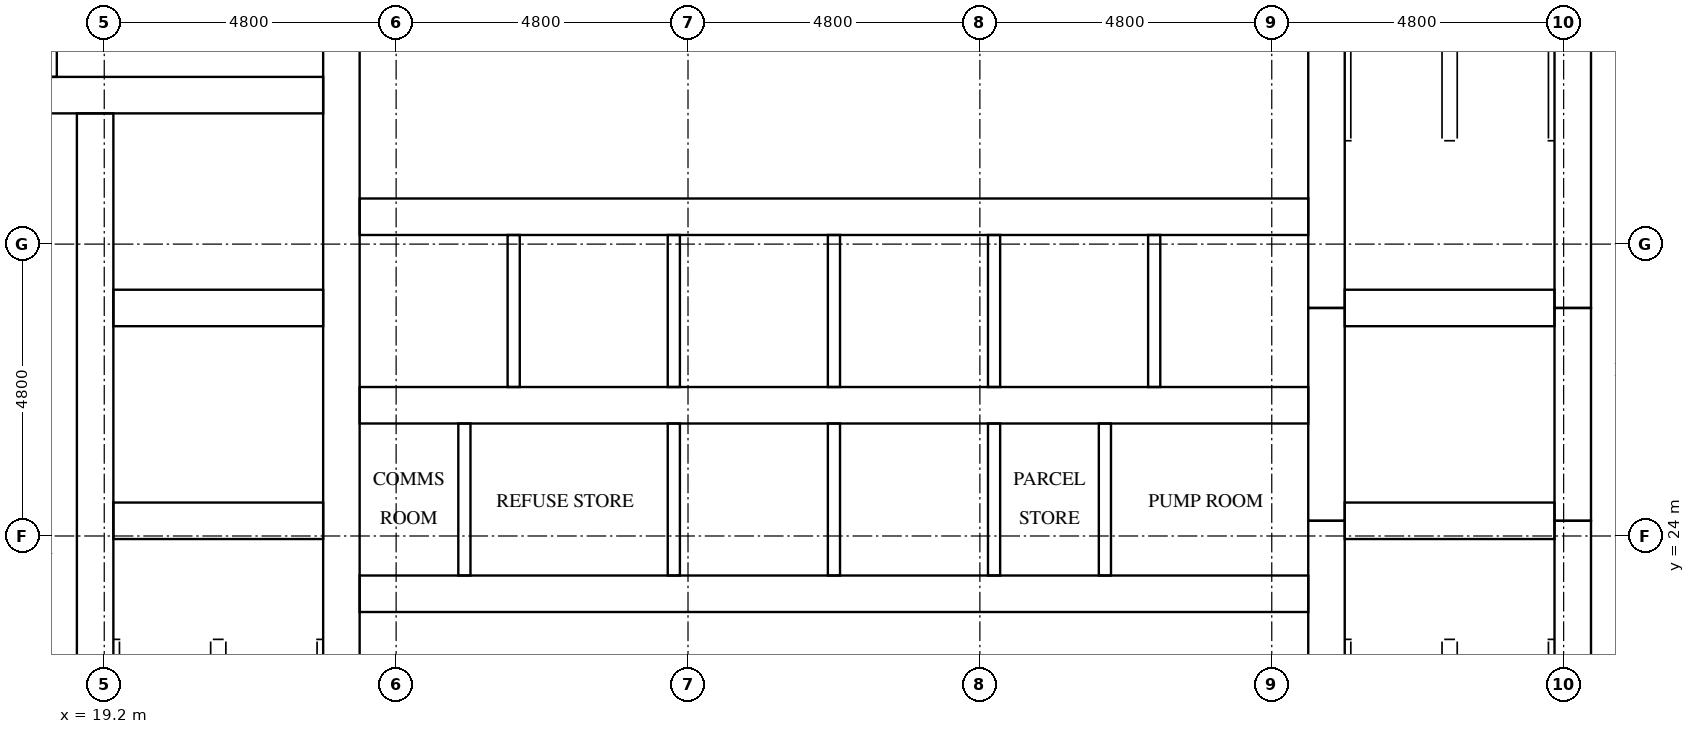
"""IFC4 building model, lengths in metres.
Left out: names, types, materials, properties, quantities, classifications, styles, units other than length and angle.
Written with IfcOpenShell. Run it as: python <this file> out.ifc"""

import sys

from ifc_helpers import new_model, si_unit, direction, frame, frame_2d, origin, place, context, subcontext, project, spatial, rectangle, extrude, element, fill, save


model = new_model("IFC4")
c1 = context("Model", 3, precision=1e-05, world=origin(), true_north=direction((0.0, 1.0)))
c2 = subcontext(c1, "Body", "Model", "MODEL_VIEW")
j1 = project(units=[si_unit("LENGTHUNIT", "METRE"), si_unit("PLANEANGLEUNIT", "RADIAN")], contexts=[c1])
p1 = place(None, origin())
s1 = spatial("IfcSite", under=j1, at=p1, CompositionType="ELEMENT")
p2 = place(p1, origin())
s2 = spatial("IfcBuilding", under=s1, at=p2, CompositionType="ELEMENT")
p3 = place(p2, frame((0.0, 0.0, 143.6)))
s3 = spatial("IfcBuildingStorey", under=s2, at=p3, CompositionType="ELEMENT", Elevation=143.6)
p4 = place(p3, frame((19.05, 15.8, 0.0), z_axis=(0.0, 0.0, 1.0), x_axis=(0.0, 1.0, 0.0)))
e1 = element("IfcWall", 1, at=p4, inside=s3, PredefinedType="SHEAR", context=c2, shape_type="SweptSolid", body=[
    extrude(rectangle(XDim=15.15, YDim=0.6, at=frame_2d((7.575, 0.0))), origin(), (0.0, 0.0, 1.0), 5.1),
])
p5 = place(p4, frame((9.65, 0.0, 0.0)))
e2 = element("IfcOpeningElement", 2, at=p5, cuts=e1, PredefinedType="OPENING", context=c2, shape_type="SweptSolid", body=[
    extrude(rectangle(XDim=1.1, YDim=2.1, at=frame_2d((0.55, 1.05))), frame((0.0, 0.31, 0.0), z_axis=(0.0, -1.0, 0.0), x_axis=(1.0, 0.0, 0.0)), (0.0, 0.0, 1.0), 0.62),
])
p6 = place(p4, frame((13.15, 0.0, 0.0)))
e3 = element("IfcOpeningElement", 3, at=p6, cuts=e1, PredefinedType="OPENING", context=c2, shape_type="SweptSolid", body=[
    extrude(rectangle(XDim=1.1, YDim=2.1, at=frame_2d((0.55, 1.05))), frame((0.0, 0.31, 0.0), z_axis=(0.0, -1.0, 0.0), x_axis=(1.0, 0.0, 0.0)), (0.0, 0.0, 1.0), 0.62),
])
p7 = place(p4, frame((0.4, 0.0, 0.0)))
e4 = element("IfcOpeningElement", 4, at=p7, cuts=e1, PredefinedType="OPENING", context=c2, shape_type="SweptSolid", body=[
    extrude(rectangle(XDim=1.2, YDim=2.1, at=frame_2d((0.6, 1.05))), frame((0.0, 0.31, 0.0), z_axis=(0.0, -1.0, 0.0), x_axis=(1.0, 0.0, 0.0)), (0.0, 0.0, 1.0), 0.62),
])
p8 = place(p3, frame((23.1, 15.8, 0.0), z_axis=(0.0, 0.0, 1.0), x_axis=(0.0, 1.0, 0.0)))
e5 = element("IfcWall", 5, at=p8, inside=s3, PredefinedType="SHEAR", context=c2, shape_type="SweptSolid", body=[
    extrude(rectangle(XDim=21.2, YDim=0.6, at=frame_2d((10.6, 0.0))), origin(), (0.0, 0.0, 1.0), 5.1),
])
p9 = place(p3, frame((39.3, 15.8, 0.0), z_axis=(0.0, 0.0, 1.0), x_axis=(0.0, 1.0, 0.0)))
e6 = element("IfcWall", 6, at=p9, inside=s3, PredefinedType="SHEAR", context=c2, shape_type="SweptSolid", body=[
    extrude(rectangle(XDim=8.45, YDim=0.6, at=frame_2d((4.225, 0.0))), origin(), (0.0, 0.0, 1.0), 5.1),
])
p10 = place(p3, frame((39.3, 24.25, 0.0), z_axis=(0.0, 0.0, 1.0), x_axis=(0.0, 1.0, 0.0)))
e7 = element("IfcWall", 7, at=p10, inside=s3, PredefinedType="SHEAR", context=c2, shape_type="SweptSolid", body=[
    extrude(rectangle(XDim=3.5, YDim=0.6, at=frame_2d((1.75, 0.0))), origin(), (0.0, 0.0, 1.0), 5.1),
])
p11 = place(p3, frame((39.3, 27.75, 0.0), z_axis=(0.0, 0.0, 1.0), x_axis=(0.0, 1.0, 0.0)))
e8 = element("IfcWall", 8, at=p11, inside=s3, PredefinedType="SHEAR", context=c2, shape_type="SweptSolid", body=[
    extrude(rectangle(XDim=9.25, YDim=0.6, at=frame_2d((4.625, 0.0))), origin(), (0.0, 0.0, 1.0), 5.1),
])
p12 = place(p3, frame((43.35, 15.8, 0.0), z_axis=(0.0, 0.0, 1.0), x_axis=(0.0, 1.0, 0.0)))
e9 = element("IfcWall", 9, at=p12, inside=s3, PredefinedType="SHEAR", context=c2, shape_type="SweptSolid", body=[
    extrude(rectangle(XDim=8.45, YDim=0.6, at=frame_2d((4.225, 0.0))), origin(), (0.0, 0.0, 1.0), 5.1),
])
p13 = place(p12, frame((0.4, 0.0, 0.0)))
e10 = element("IfcOpeningElement", 10, at=p13, cuts=e9, PredefinedType="OPENING", context=c2, shape_type="SweptSolid", body=[
    extrude(rectangle(XDim=1.2, YDim=2.1, at=frame_2d((0.6, 1.05))), frame((0.0, 0.31, 0.0), z_axis=(0.0, -1.0, 0.0), x_axis=(1.0, 0.0, 0.0)), (0.0, 0.0, 1.0), 0.62),
])
p14 = place(p3, frame((43.35, 24.25, 0.0), z_axis=(0.0, 0.0, 1.0), x_axis=(0.0, 1.0, 0.0)))
e11 = element("IfcWall", 11, at=p14, inside=s3, PredefinedType="SHEAR", context=c2, shape_type="SweptSolid", body=[
    extrude(rectangle(XDim=3.5, YDim=0.6, at=frame_2d((1.75, 0.0))), origin(), (0.0, 0.0, 1.0), 5.1),
])
p15 = place(p14, frame((1.2, 0.0, 0.0)))
e12 = element("IfcOpeningElement", 12, at=p15, cuts=e11, PredefinedType="OPENING", context=c2, shape_type="SweptSolid", body=[
    extrude(rectangle(XDim=1.1, YDim=2.1, at=frame_2d((0.55, 1.05))), frame((0.0, 0.31, 0.0), z_axis=(0.0, -1.0, 0.0), x_axis=(1.0, 0.0, 0.0)), (0.0, 0.0, 1.0), 0.62),
])
p16 = place(p3, frame((43.35, 27.75, 0.0), z_axis=(0.0, 0.0, 1.0), x_axis=(0.0, 1.0, 0.0)))
e13 = element("IfcWall", 13, at=p16, inside=s3, PredefinedType="SHEAR", context=c2, shape_type="SweptSolid", body=[
    extrude(rectangle(XDim=9.25, YDim=0.6, at=frame_2d((4.625, 0.0))), origin(), (0.0, 0.0, 1.0), 5.1),
])
p17 = place(p16, frame((7.65, 0.0, 0.0)))
e14 = element("IfcOpeningElement", 14, at=p17, cuts=e13, PredefinedType="OPENING", context=c2, shape_type="SweptSolid", body=[
    extrude(rectangle(XDim=1.2, YDim=2.1, at=frame_2d((0.6, 1.05))), frame((0.0, 0.31, 0.0), z_axis=(0.0, -1.0, 0.0), x_axis=(1.0, 0.0, 0.0)), (0.0, 0.0, 1.0), 0.62),
])
for number, where, z_axis, x_axis in (
    (15, (19.35, 24.25, 0.0), (0.0, 0.0, 1.0), (1.0, 0.0, 0.0)),
    (16, (19.35, 27.75, 0.0), (0.0, 0.0, 1.0), (1.0, 0.0, 0.0)),
):
    element("IfcWall", number, at=place(p3, frame(where, z_axis=z_axis, x_axis=x_axis)), inside=s3, PredefinedType="SHEAR", context=c2, shape_type="SweptSolid", body=[
        extrude(rectangle(XDim=3.45, YDim=0.6, at=frame_2d((1.725, 0.0))), origin(), (0.0, 0.0, 1.0), 5.1),
    ])
p18 = place(p3, frame((15.8, 31.25, 0.0), z_axis=(0.0, 0.0, 1.0), x_axis=(1.0, 0.0, 0.0)))
e17 = element("IfcWall", 17, at=p18, inside=s3, PredefinedType="SHEAR", context=c2, shape_type="SweptSolid", body=[
    extrude(rectangle(XDim=7.0, YDim=0.6, at=frame_2d((3.5, 0.0))), origin(), (0.0, 0.0, 1.0), 5.1),
])
for number, where, z_axis, x_axis in (
    (18, (39.6, 24.25, 0.0), (0.0, 0.0, 1.0), (1.0, 0.0, 0.0)),
    (19, (39.6, 27.75, 0.0), (0.0, 0.0, 1.0), (1.0, 0.0, 0.0)),
):
    element("IfcWall", number, at=place(p3, frame(where, z_axis=z_axis, x_axis=x_axis)), inside=s3, PredefinedType="SHEAR", context=c2, shape_type="SweptSolid", body=[
        extrude(rectangle(XDim=3.45, YDim=0.6, at=frame_2d((1.725, 0.0))), origin(), (0.0, 0.0, 1.0), 5.1),
    ])
p19 = place(p3, frame((23.4, 23.05, 0.0), z_axis=(0.0, 0.0, 1.0), x_axis=(1.0, 0.0, 0.0)))
e20 = element("IfcWall", 20, at=p19, inside=s3, PredefinedType="SHEAR", context=c2, shape_type="SweptSolid", body=[
    extrude(rectangle(XDim=15.6, YDim=0.6, at=frame_2d((7.8, 0.0))), origin(), (0.0, 0.0, 1.0), 5.1),
])
p20 = place(p19, frame((0.311, 0.0, 0.0)))
e21 = element("IfcOpeningElement", 21, at=p20, cuts=e20, PredefinedType="OPENING", context=c2, shape_type="SweptSolid", body=[
    extrude(rectangle(XDim=1.0, YDim=2.1, at=frame_2d((0.5, 1.05))), frame((0.0, 0.31, 0.0), z_axis=(0.0, -1.0, 0.0), x_axis=(1.0, 0.0, 0.0)), (0.0, 0.0, 1.0), 0.62),
])
p21 = place(p19, frame((2.945, 0.0, 0.0)))
e22 = element("IfcOpeningElement", 22, at=p21, cuts=e20, PredefinedType="OPENING", context=c2, shape_type="SweptSolid", body=[
    extrude(rectangle(XDim=1.0, YDim=2.1, at=frame_2d((0.5, 1.05))), frame((0.0, 0.31, 0.0), z_axis=(0.0, -1.0, 0.0), x_axis=(1.0, 0.0, 0.0)), (0.0, 0.0, 1.0), 0.62),
])
p22 = place(p19, frame((10.845, 0.0, 0.0)))
e23 = element("IfcOpeningElement", 23, at=p22, cuts=e20, PredefinedType="OPENING", context=c2, shape_type="SweptSolid", body=[
    extrude(rectangle(XDim=1.0, YDim=2.1, at=frame_2d((0.5, 1.05))), frame((0.0, 0.31, 0.0), z_axis=(0.0, -1.0, 0.0), x_axis=(1.0, 0.0, 0.0)), (0.0, 0.0, 1.0), 0.62),
])
p23 = place(p19, frame((13.478, 0.0, 0.0)))
e24 = element("IfcOpeningElement", 24, at=p23, cuts=e20, PredefinedType="OPENING", context=c2, shape_type="SweptSolid", body=[
    extrude(rectangle(XDim=1.0, YDim=2.1, at=frame_2d((0.5, 1.05))), frame((0.0, 0.31, 0.0), z_axis=(0.0, -1.0, 0.0), x_axis=(1.0, 0.0, 0.0)), (0.0, 0.0, 1.0), 0.62),
])
p24 = place(p3, frame((23.4, 26.15, 0.0), z_axis=(0.0, 0.0, 1.0), x_axis=(1.0, 0.0, 0.0)))
e25 = element("IfcWall", 25, at=p24, inside=s3, PredefinedType="SHEAR", context=c2, shape_type="SweptSolid", body=[
    extrude(rectangle(XDim=15.6, YDim=0.6, at=frame_2d((7.8, 0.0))), origin(), (0.0, 0.0, 1.0), 5.1),
])
p25 = place(p3, frame((23.4, 29.25, 0.0), z_axis=(0.0, 0.0, 1.0), x_axis=(1.0, 0.0, 0.0)))
e26 = element("IfcWall", 26, at=p25, inside=s3, PredefinedType="SHEAR", context=c2, shape_type="SweptSolid", body=[
    extrude(rectangle(XDim=15.6, YDim=0.6, at=frame_2d((7.8, 0.0))), origin(), (0.0, 0.0, 1.0), 5.1),
])
p26 = place(p25, frame((0.667, 0.0, 0.0)))
e27 = element("IfcOpeningElement", 27, at=p26, cuts=e26, PredefinedType="OPENING", context=c2, shape_type="SweptSolid", body=[
    extrude(rectangle(XDim=1.1, YDim=2.1, at=frame_2d((0.55, 1.05))), frame((0.0, 0.31, 0.0), z_axis=(0.0, -1.0, 0.0), x_axis=(1.0, 0.0, 0.0)), (0.0, 0.0, 1.0), 0.62),
])
p27 = place(p25, frame((3.3, 0.0, 0.0)))
e28 = element("IfcOpeningElement", 28, at=p27, cuts=e26, PredefinedType="OPENING", context=c2, shape_type="SweptSolid", body=[
    extrude(rectangle(XDim=1.1, YDim=2.1, at=frame_2d((0.55, 1.05))), frame((0.0, 0.31, 0.0), z_axis=(0.0, -1.0, 0.0), x_axis=(1.0, 0.0, 0.0)), (0.0, 0.0, 1.0), 0.62),
])
p28 = place(p25, frame((5.933, 0.0, 0.0)))
e29 = element("IfcOpeningElement", 29, at=p28, cuts=e26, PredefinedType="OPENING", context=c2, shape_type="SweptSolid", body=[
    extrude(rectangle(XDim=1.1, YDim=2.1, at=frame_2d((0.55, 1.05))), frame((0.0, 0.31, 0.0), z_axis=(0.0, -1.0, 0.0), x_axis=(1.0, 0.0, 0.0)), (0.0, 0.0, 1.0), 0.62),
])
p29 = place(p25, frame((8.567, 0.0, 0.0)))
e30 = element("IfcOpeningElement", 30, at=p29, cuts=e26, PredefinedType="OPENING", context=c2, shape_type="SweptSolid", body=[
    extrude(rectangle(XDim=1.1, YDim=2.1, at=frame_2d((0.55, 1.05))), frame((0.0, 0.31, 0.0), z_axis=(0.0, -1.0, 0.0), x_axis=(1.0, 0.0, 0.0)), (0.0, 0.0, 1.0), 0.62),
])
p30 = place(p25, frame((11.2, 0.0, 0.0)))
e31 = element("IfcOpeningElement", 31, at=p30, cuts=e26, PredefinedType="OPENING", context=c2, shape_type="SweptSolid", body=[
    extrude(rectangle(XDim=1.1, YDim=2.1, at=frame_2d((0.55, 1.05))), frame((0.0, 0.31, 0.0), z_axis=(0.0, -1.0, 0.0), x_axis=(1.0, 0.0, 0.0)), (0.0, 0.0, 1.0), 0.62),
])
p31 = place(p25, frame((13.833, 0.0, 0.0)))
e32 = element("IfcOpeningElement", 32, at=p31, cuts=e26, PredefinedType="OPENING", context=c2, shape_type="SweptSolid", body=[
    extrude(rectangle(XDim=1.1, YDim=2.1, at=frame_2d((0.55, 1.05))), frame((0.0, 0.31, 0.0), z_axis=(0.0, -1.0, 0.0), x_axis=(1.0, 0.0, 0.0)), (0.0, 0.0, 1.0), 0.62),
])
for number, where, z_axis, x_axis in (
    (33, (25.933, 26.45, 0.0), (0.0, 0.0, 1.0), (0.0, 1.0, 0.0)),
    (34, (28.567, 23.35, 0.0), (0.0, 0.0, 1.0), (0.0, 1.0, 0.0)),
    (35, (28.567, 26.45, 0.0), (0.0, 0.0, 1.0), (0.0, 1.0, 0.0)),
    (36, (31.2, 23.35, 0.0), (0.0, 0.0, 1.0), (0.0, 1.0, 0.0)),
    (37, (31.2, 26.45, 0.0), (0.0, 0.0, 1.0), (0.0, 1.0, 0.0)),
    (38, (33.833, 23.35, 0.0), (0.0, 0.0, 1.0), (0.0, 1.0, 0.0)),
    (39, (33.833, 26.45, 0.0), (0.0, 0.0, 1.0), (0.0, 1.0, 0.0)),
    (40, (36.467, 26.45, 0.0), (0.0, 0.0, 1.0), (0.0, 1.0, 0.0)),
):
    element("IfcWall", number, at=place(p3, frame(where, z_axis=z_axis, x_axis=x_axis)), inside=s3, PredefinedType="SOLIDWALL", context=c2, shape_type="SweptSolid", body=[
        extrude(rectangle(XDim=2.5, YDim=0.2, at=frame_2d((1.25, 0.0))), origin(), (0.0, 0.0, 1.0), 5.1),
    ])
p32 = place(p3, frame((18.32, 31.55, 0.0), z_axis=(0.0, 0.0, 1.0), x_axis=(0.0, 1.0, 0.0)))
e41 = element("IfcWall", 41, at=p32, inside=s3, PredefinedType="PARTITIONING", context=c2, shape_type="SweptSolid", body=[
    extrude(rectangle(XDim=5.45, YDim=0.2, at=frame_2d((2.725, 0.0))), origin(), (0.0, 0.0, 1.0), 5.1),
])
for number, where, z_axis, x_axis in (
    (42, (25.123, 23.35, 0.0), (0.0, 0.0, 1.0), (0.0, 1.0, 0.0)),
    (43, (35.656, 23.35, 0.0), (0.0, 0.0, 1.0), (0.0, 1.0, 0.0)),
):
    element("IfcWall", number, at=place(p3, frame(where, z_axis=z_axis, x_axis=x_axis)), inside=s3, PredefinedType="PARTITIONING", context=c2, shape_type="SweptSolid", body=[
        extrude(rectangle(XDim=2.5, YDim=0.2, at=frame_2d((1.25, 0.0))), origin(), (0.0, 0.0, 1.0), 5.1),
    ])
p33 = place(p26, origin())
e44 = element("IfcDoor", 44, at=p33, inside=s3, OperationType="DOUBLE_DOOR_SLIDING", PredefinedType="DOOR", context=c2, shape_type="SweptSolid", body=[
    extrude(rectangle(XDim=1.1, YDim=2.1, at=frame_2d((0.55, 1.05))), frame((0.0, 0.025, 0.0), z_axis=(0.0, -1.0, 0.0), x_axis=(1.0, 0.0, 0.0)), (0.0, 0.0, 1.0), 0.05),
])
fill(e27, e44)
p34 = place(p27, origin())
e45 = element("IfcDoor", 45, at=p34, inside=s3, OperationType="DOUBLE_DOOR_SLIDING", PredefinedType="DOOR", context=c2, shape_type="SweptSolid", body=[
    extrude(rectangle(XDim=1.1, YDim=2.1, at=frame_2d((0.55, 1.05))), frame((0.0, 0.025, 0.0), z_axis=(0.0, -1.0, 0.0), x_axis=(1.0, 0.0, 0.0)), (0.0, 0.0, 1.0), 0.05),
])
fill(e28, e45)
p35 = place(p28, origin())
e46 = element("IfcDoor", 46, at=p35, inside=s3, OperationType="DOUBLE_DOOR_SLIDING", PredefinedType="DOOR", context=c2, shape_type="SweptSolid", body=[
    extrude(rectangle(XDim=1.1, YDim=2.1, at=frame_2d((0.55, 1.05))), frame((0.0, 0.025, 0.0), z_axis=(0.0, -1.0, 0.0), x_axis=(1.0, 0.0, 0.0)), (0.0, 0.0, 1.0), 0.05),
])
fill(e29, e46)
p36 = place(p29, origin())
e47 = element("IfcDoor", 47, at=p36, inside=s3, OperationType="DOUBLE_DOOR_SLIDING", PredefinedType="DOOR", context=c2, shape_type="SweptSolid", body=[
    extrude(rectangle(XDim=1.1, YDim=2.1, at=frame_2d((0.55, 1.05))), frame((0.0, 0.025, 0.0), z_axis=(0.0, -1.0, 0.0), x_axis=(1.0, 0.0, 0.0)), (0.0, 0.0, 1.0), 0.05),
])
fill(e30, e47)
p37 = place(p30, origin())
e48 = element("IfcDoor", 48, at=p37, inside=s3, OperationType="DOUBLE_DOOR_SLIDING", PredefinedType="DOOR", context=c2, shape_type="SweptSolid", body=[
    extrude(rectangle(XDim=1.1, YDim=2.1, at=frame_2d((0.55, 1.05))), frame((0.0, 0.025, 0.0), z_axis=(0.0, -1.0, 0.0), x_axis=(1.0, 0.0, 0.0)), (0.0, 0.0, 1.0), 0.05),
])
fill(e31, e48)
p38 = place(p31, origin())
e49 = element("IfcDoor", 49, at=p38, inside=s3, OperationType="DOUBLE_DOOR_SLIDING", PredefinedType="DOOR", context=c2, shape_type="SweptSolid", body=[
    extrude(rectangle(XDim=1.1, YDim=2.1, at=frame_2d((0.55, 1.05))), frame((0.0, 0.025, 0.0), z_axis=(0.0, -1.0, 0.0), x_axis=(1.0, 0.0, 0.0)), (0.0, 0.0, 1.0), 0.05),
])
fill(e32, e49)
p39 = place(p5, origin())
e50 = element("IfcDoor", 50, at=p39, inside=s3, OperationType="DOUBLE_DOOR_SLIDING", PredefinedType="DOOR", context=c2, shape_type="SweptSolid", body=[
    extrude(rectangle(XDim=1.1, YDim=2.1, at=frame_2d((0.55, 1.05))), frame((0.0, 0.025, 0.0), z_axis=(0.0, -1.0, 0.0), x_axis=(1.0, 0.0, 0.0)), (0.0, 0.0, 1.0), 0.05),
])
fill(e2, e50)
p40 = place(p6, origin())
e51 = element("IfcDoor", 51, at=p40, inside=s3, OperationType="DOUBLE_DOOR_SLIDING", PredefinedType="DOOR", context=c2, shape_type="SweptSolid", body=[
    extrude(rectangle(XDim=1.1, YDim=2.1, at=frame_2d((0.55, 1.05))), frame((0.0, 0.025, 0.0), z_axis=(0.0, -1.0, 0.0), x_axis=(1.0, 0.0, 0.0)), (0.0, 0.0, 1.0), 0.05),
])
fill(e3, e51)
p41 = place(p15, origin())
e52 = element("IfcDoor", 52, at=p41, inside=s3, OperationType="DOUBLE_DOOR_SLIDING", PredefinedType="DOOR", context=c2, shape_type="SweptSolid", body=[
    extrude(rectangle(XDim=1.1, YDim=2.1, at=frame_2d((0.55, 1.05))), frame((0.0, 0.025, 0.0), z_axis=(0.0, -1.0, 0.0), x_axis=(1.0, 0.0, 0.0)), (0.0, 0.0, 1.0), 0.05),
])
fill(e12, e52)
p42 = place(p20, frame((1.0, 0.0, 0.0), z_axis=(0.0, 0.0, 1.0), x_axis=(-1.0, 0.0, 0.0)))
e53 = element("IfcDoor", 53, at=p42, inside=s3, OperationType="SINGLE_SWING_RIGHT", PredefinedType="DOOR", context=c2, shape_type="SweptSolid", body=[
    extrude(rectangle(XDim=1.0, YDim=2.1, at=frame_2d((0.5, 1.05))), frame((0.0, 0.025, 0.0), z_axis=(0.0, -1.0, 0.0), x_axis=(1.0, 0.0, 0.0)), (0.0, 0.0, 1.0), 0.05),
])
fill(e21, e53)
p43 = place(p21, frame((1.0, 0.0, 0.0), z_axis=(0.0, 0.0, 1.0), x_axis=(-1.0, 0.0, 0.0)))
e54 = element("IfcDoor", 54, at=p43, inside=s3, OperationType="SINGLE_SWING_LEFT", PredefinedType="DOOR", context=c2, shape_type="SweptSolid", body=[
    extrude(rectangle(XDim=1.0, YDim=2.1, at=frame_2d((0.5, 1.05))), frame((0.0, 0.025, 0.0), z_axis=(0.0, -1.0, 0.0), x_axis=(1.0, 0.0, 0.0)), (0.0, 0.0, 1.0), 0.05),
])
fill(e22, e54)
p44 = place(p22, frame((1.0, 0.0, 0.0), z_axis=(0.0, 0.0, 1.0), x_axis=(-1.0, 0.0, 0.0)))
e55 = element("IfcDoor", 55, at=p44, inside=s3, OperationType="SINGLE_SWING_RIGHT", PredefinedType="DOOR", context=c2, shape_type="SweptSolid", body=[
    extrude(rectangle(XDim=1.0, YDim=2.1, at=frame_2d((0.5, 1.05))), frame((0.0, 0.025, 0.0), z_axis=(0.0, -1.0, 0.0), x_axis=(1.0, 0.0, 0.0)), (0.0, 0.0, 1.0), 0.05),
])
fill(e23, e55)
p45 = place(p23, frame((1.0, 0.0, 0.0), z_axis=(0.0, 0.0, 1.0), x_axis=(-1.0, 0.0, 0.0)))
e56 = element("IfcDoor", 56, at=p45, inside=s3, OperationType="SINGLE_SWING_LEFT", PredefinedType="DOOR", context=c2, shape_type="SweptSolid", body=[
    extrude(rectangle(XDim=1.0, YDim=2.1, at=frame_2d((0.5, 1.05))), frame((0.0, 0.025, 0.0), z_axis=(0.0, -1.0, 0.0), x_axis=(1.0, 0.0, 0.0)), (0.0, 0.0, 1.0), 0.05),
])
fill(e24, e56)
save(model, sys.argv[1])
